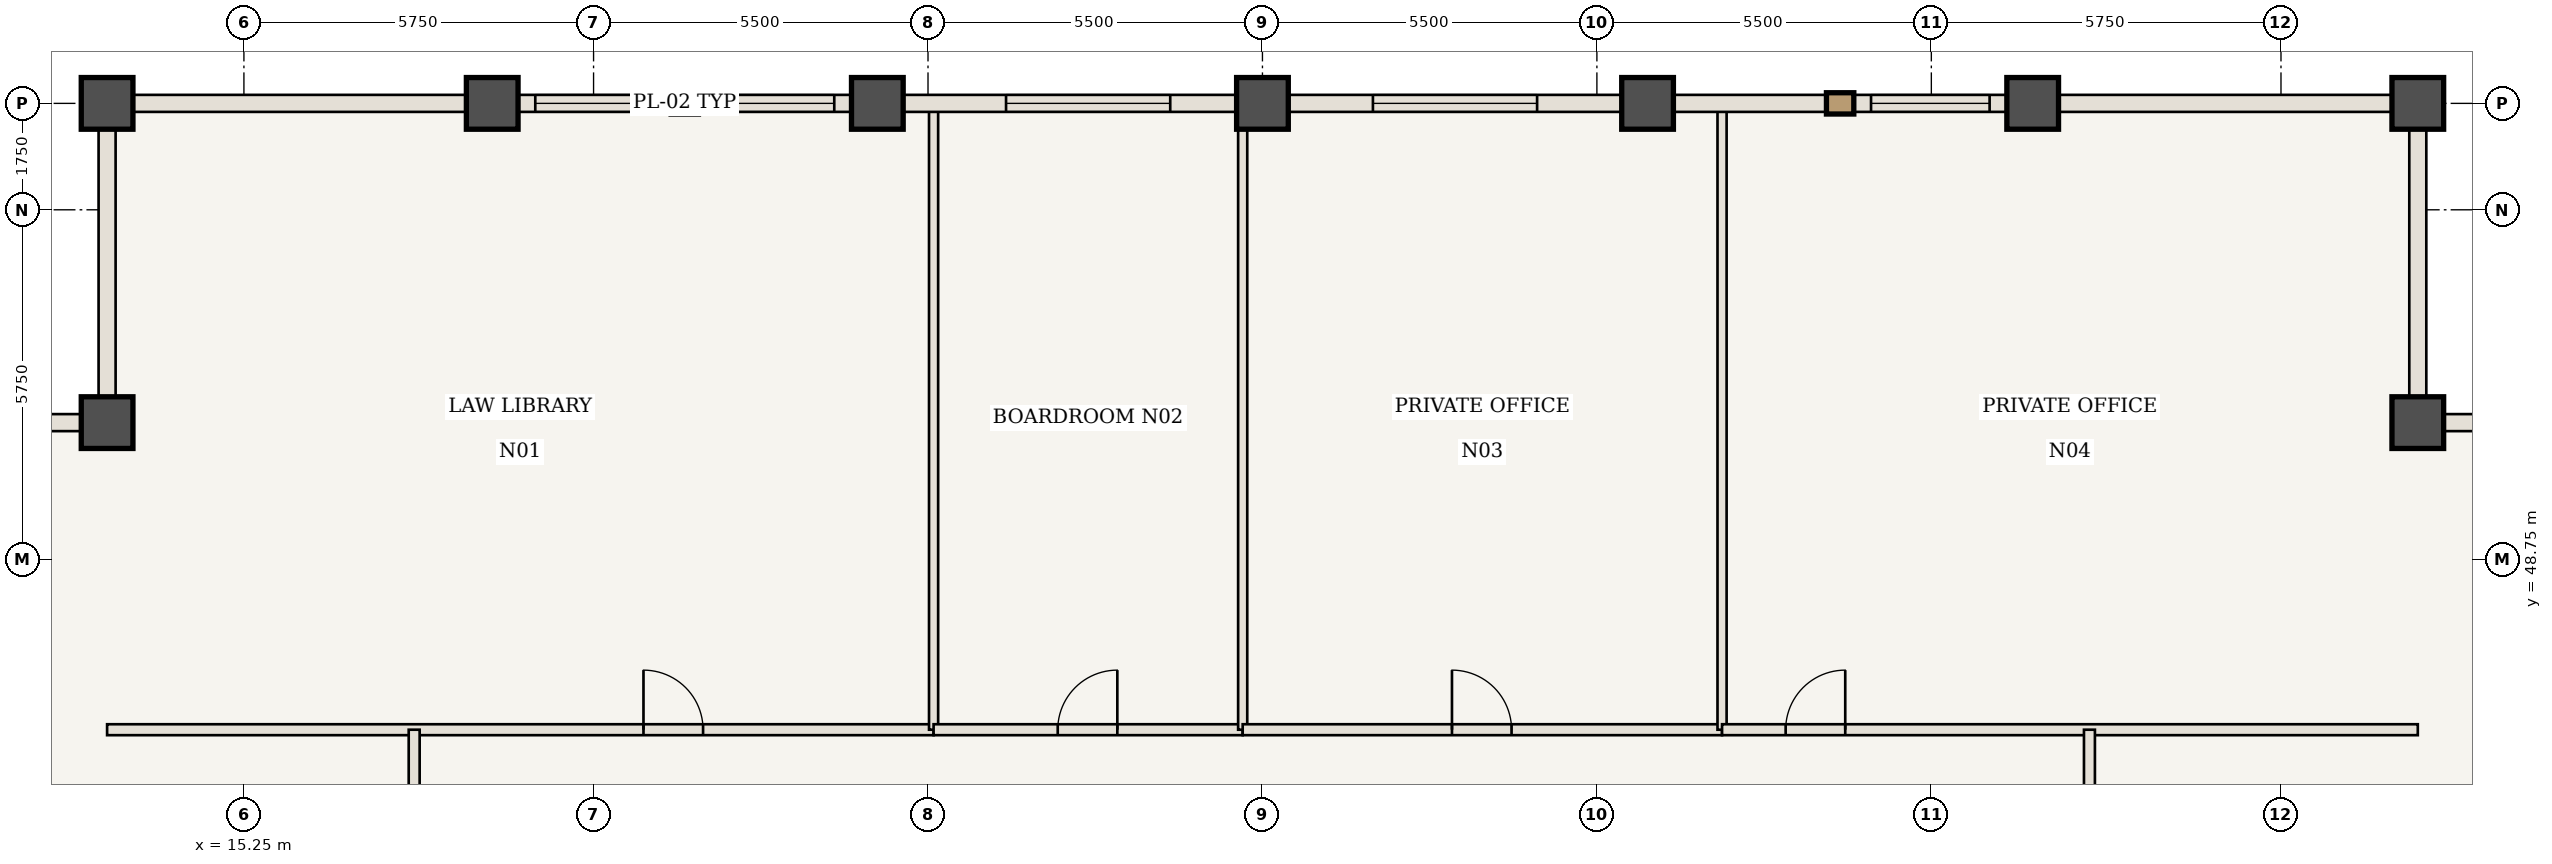
"""IFC4 building model, lengths in metres.
Left out: names, types, materials, properties, quantities, classifications, styles, units other than length and angle.
Written with IfcOpenShell. Run it as: python <this file> out.ifc"""

import sys

from ifc_helpers import new_model, si_unit, direction, frame, frame_2d, origin, origin_2d, place, context, subcontext, project, spatial, rectangle, extrude, element, fill, save


model = new_model("IFC4")
c1 = context("Model", 3, precision=1e-05, world=origin(), true_north=direction((0.0, 1.0)))
c2 = subcontext(c1, "Body", "Model", "MODEL_VIEW")
j1 = project(units=[si_unit("LENGTHUNIT", "METRE"), si_unit("PLANEANGLEUNIT", "RADIAN")], contexts=[c1])
p1 = place(None, origin())
s1 = spatial("IfcSite", under=j1, at=p1, CompositionType="ELEMENT")
p2 = place(p1, origin())
s2 = spatial("IfcBuilding", under=s1, at=p2, CompositionType="ELEMENT")
p3 = place(p2, frame((0.0, 0.0, 206.15)))
s3 = spatial("IfcBuildingStorey", under=s2, at=p3, CompositionType="ELEMENT", Elevation=206.15)
for number, where, z_axis, x_axis in (
    (1, (51.0, 51.0, 0.0), (0.0, 0.0, 1.0), (1.0, 0.0, 0.0)),
    (2, (51.0, 56.25, 0.0), (0.0, 0.0, 1.0), (1.0, 0.0, 0.0)),
    (3, (13.0, 56.25, 0.0), (0.0, 0.0, 1.0), (1.0, 0.0, 0.0)),
    (4, (13.0, 51.0, 0.0), (0.0, 0.0, 1.0), (1.0, 0.0, 0.0)),
    (5, (19.333, 56.25, 0.0), (0.0, 0.0, 1.0), (1.0, 0.0, 0.0)),
    (6, (25.667, 56.25, 0.0), (0.0, 0.0, 1.0), (1.0, 0.0, 0.0)),
    (7, (32.0, 56.25, 0.0), (0.0, 0.0, 1.0), (1.0, 0.0, 0.0)),
    (8, (38.333, 56.25, 0.0), (0.0, 0.0, 1.0), (1.0, 0.0, 0.0)),
    (9, (44.667, 56.25, 0.0), (0.0, 0.0, 1.0), (1.0, 0.0, 0.0)),
):
    element("IfcColumn", number, at=place(p3, frame(where, z_axis=z_axis, x_axis=x_axis)), inside=s3, PredefinedType="COLUMN", context=c2, shape_type="SweptSolid", body=[
        extrude(rectangle(XDim=0.85, YDim=0.85, at=origin_2d()), origin(), (0.0, 0.0, 1.0), 3.85),
    ])
p4 = place(p3, frame((13.0, 45.95, 0.0), z_axis=(0.0, 0.0, 1.0), x_axis=(1.0, 0.0, 0.0)))
e10 = element("IfcWall", 10, at=p4, inside=s3, PredefinedType="STANDARD", context=c2, shape_type="SweptSolid", body=[
    extrude(rectangle(XDim=13.592, YDim=0.18, at=frame_2d((6.796, 0.0))), origin(), (0.0, 0.0, 1.0), 3.685),
])
p5 = place(p4, frame((8.821, 0.0, 0.0)))
e11 = element("IfcOpeningElement", 11, at=p5, cuts=e10, PredefinedType="OPENING", context=c2, shape_type="SweptSolid", body=[
    extrude(rectangle(XDim=0.98, YDim=2.2, at=frame_2d((0.49, 1.1))), frame((0.0, 0.1, 0.0), z_axis=(0.0, -1.0, 0.0), x_axis=(1.0, 0.0, 0.0)), (0.0, 0.0, 1.0), 0.2),
])
p6 = place(p3, frame((26.592, 45.95, 0.0), z_axis=(0.0, 0.0, 1.0), x_axis=(0.0, 1.0, 0.0)))
e12 = element("IfcWall", 12, at=p6, inside=s3, PredefinedType="STANDARD", context=c2, shape_type="SweptSolid", body=[
    extrude(rectangle(XDim=10.24, YDim=0.15, at=frame_2d((5.12, 0.0))), origin(), (0.0, 0.0, 1.0), 3.685),
])
p7 = place(p3, frame((26.592, 45.95, 0.0), z_axis=(0.0, 0.0, 1.0), x_axis=(1.0, 0.0, 0.0)))
e13 = element("IfcWall", 13, at=p7, inside=s3, PredefinedType="STANDARD", context=c2, shape_type="SweptSolid", body=[
    extrude(rectangle(XDim=5.083, YDim=0.18, at=frame_2d((2.542, 0.0))), origin(), (0.0, 0.0, 1.0), 3.685),
])
p8 = place(p7, frame((2.042, 0.0, 0.0)))
e14 = element("IfcOpeningElement", 14, at=p8, cuts=e13, PredefinedType="OPENING", context=c2, shape_type="SweptSolid", body=[
    extrude(rectangle(XDim=0.98, YDim=2.2, at=frame_2d((0.49, 1.1))), frame((0.0, 0.1, 0.0), z_axis=(0.0, -1.0, 0.0), x_axis=(1.0, 0.0, 0.0)), (0.0, 0.0, 1.0), 0.2),
])
p9 = place(p3, frame((31.675, 45.95, 0.0), z_axis=(0.0, 0.0, 1.0), x_axis=(0.0, 1.0, 0.0)))
e15 = element("IfcWall", 15, at=p9, inside=s3, PredefinedType="STANDARD", context=c2, shape_type="SweptSolid", body=[
    extrude(rectangle(XDim=10.24, YDim=0.15, at=frame_2d((5.12, 0.0))), origin(), (0.0, 0.0, 1.0), 3.685),
])
p10 = place(p3, frame((31.675, 45.95, 0.0), z_axis=(0.0, 0.0, 1.0), x_axis=(1.0, 0.0, 0.0)))
e16 = element("IfcWall", 16, at=p10, inside=s3, PredefinedType="STANDARD", context=c2, shape_type="SweptSolid", body=[
    extrude(rectangle(XDim=7.883, YDim=0.18, at=frame_2d((3.942, 0.0))), origin(), (0.0, 0.0, 1.0), 3.685),
])
p11 = place(p10, frame((3.442, 0.0, 0.0)))
e17 = element("IfcOpeningElement", 17, at=p11, cuts=e16, PredefinedType="OPENING", context=c2, shape_type="SweptSolid", body=[
    extrude(rectangle(XDim=0.98, YDim=2.2, at=frame_2d((0.49, 1.1))), frame((0.0, 0.1, 0.0), z_axis=(0.0, -1.0, 0.0), x_axis=(1.0, 0.0, 0.0)), (0.0, 0.0, 1.0), 0.2),
])
p12 = place(p3, frame((39.558, 45.95, 0.0), z_axis=(0.0, 0.0, 1.0), x_axis=(0.0, 1.0, 0.0)))
e18 = element("IfcWall", 18, at=p12, inside=s3, PredefinedType="STANDARD", context=c2, shape_type="SweptSolid", body=[
    extrude(rectangle(XDim=10.24, YDim=0.15, at=frame_2d((5.12, 0.0))), origin(), (0.0, 0.0, 1.0), 3.685),
])
p13 = place(p3, frame((39.558, 45.95, 0.0), z_axis=(0.0, 0.0, 1.0), x_axis=(1.0, 0.0, 0.0)))
e19 = element("IfcWall", 19, at=p13, inside=s3, PredefinedType="STANDARD", context=c2, shape_type="SweptSolid", body=[
    extrude(rectangle(XDim=11.442, YDim=0.18, at=frame_2d((5.721, 0.0))), origin(), (0.0, 0.0, 1.0), 3.685),
])
p14 = place(p13, frame((1.046, 0.0, 0.0)))
e20 = element("IfcOpeningElement", 20, at=p14, cuts=e19, PredefinedType="OPENING", context=c2, shape_type="SweptSolid", body=[
    extrude(rectangle(XDim=0.98, YDim=2.2, at=frame_2d((0.49, 1.1))), frame((0.0, 0.1, 0.0), z_axis=(0.0, -1.0, 0.0), x_axis=(1.0, 0.0, 0.0)), (0.0, 0.0, 1.0), 0.2),
])
p15 = place(p3, frame((18.05, 30.875, 0.0), z_axis=(0.0, 0.0, 1.0), x_axis=(0.0, 1.0, 0.0)))
e21 = element("IfcWall", 21, at=p15, inside=s3, PredefinedType="STANDARD", context=c2, shape_type="SweptSolid", body=[
    extrude(rectangle(XDim=15.075, YDim=0.18, at=frame_2d((7.538, 0.0))), origin(), (0.0, 0.0, 1.0), 3.685),
])
p16 = place(p15, frame((7.038, 0.0, 0.0)))
e22 = element("IfcOpeningElement", 22, at=p16, cuts=e21, PredefinedType="OPENING", context=c2, shape_type="SweptSolid", body=[
    extrude(rectangle(XDim=0.98, YDim=2.2, at=frame_2d((0.49, 1.1))), frame((0.0, 0.1, 0.0), z_axis=(0.0, -1.0, 0.0), x_axis=(1.0, 0.0, 0.0)), (0.0, 0.0, 1.0), 0.2),
])
p17 = place(p3, frame((45.6, 30.75, 0.0), z_axis=(0.0, 0.0, 1.0), x_axis=(0.0, 1.0, 0.0)))
e23 = element("IfcWall", 23, at=p17, inside=s3, PredefinedType="STANDARD", context=c2, shape_type="SweptSolid", body=[
    extrude(rectangle(XDim=15.2, YDim=0.18, at=frame_2d((7.6, 0.0))), origin(), (0.0, 0.0, 1.0), 3.685),
])
p18 = place(p17, frame((7.1, 0.0, 0.0)))
e24 = element("IfcOpeningElement", 24, at=p18, cuts=e23, PredefinedType="OPENING", context=c2, shape_type="SweptSolid", body=[
    extrude(rectangle(XDim=0.98, YDim=2.2, at=frame_2d((0.49, 1.1))), frame((0.0, 0.1, 0.0), z_axis=(0.0, -1.0, 0.0), x_axis=(1.0, 0.0, 0.0)), (0.0, 0.0, 1.0), 0.2),
])
p19 = place(p3, frame((13.0, 56.25, 0.0), z_axis=(0.0, 0.0, 1.0), x_axis=(1.0, 0.0, 0.0)))
e25 = element("IfcWall", 25, at=p19, inside=s3, PredefinedType="USERDEFINED", context=c2, shape_type="SweptSolid", body=[
    extrude(rectangle(XDim=6.333, YDim=0.28, at=frame_2d((3.167, 0.0))), origin(), (0.0, 0.0, 1.0), 2.985),
])
p20 = place(p3, frame((19.333, 56.25, 0.0), z_axis=(0.0, 0.0, 1.0), x_axis=(1.0, 0.0, 0.0)))
e26 = element("IfcWall", 26, at=p20, inside=s3, PredefinedType="USERDEFINED", context=c2, shape_type="SweptSolid", body=[
    extrude(rectangle(XDim=6.333, YDim=0.28, at=frame_2d((3.167, 0.0))), origin(), (0.0, 0.0, 1.0), 2.985),
])
p21 = place(p20, frame((0.708, 0.0, 0.85)))
e27 = element("IfcOpeningElement", 27, at=p21, cuts=e26, PredefinedType="OPENING", context=c2, shape_type="SweptSolid", body=[
    extrude(rectangle(XDim=1.95, YDim=1.935, at=frame_2d((0.975, 0.968))), frame((0.0, 0.15, 0.0), z_axis=(0.0, -1.0, 0.0), x_axis=(1.0, 0.0, 0.0)), (0.0, 0.0, 1.0), 0.3),
])
p22 = place(p20, frame((3.675, 0.0, 0.85)))
e28 = element("IfcOpeningElement", 28, at=p22, cuts=e26, PredefinedType="OPENING", context=c2, shape_type="SweptSolid", body=[
    extrude(rectangle(XDim=1.95, YDim=1.935, at=frame_2d((0.975, 0.968))), frame((0.0, 0.15, 0.0), z_axis=(0.0, -1.0, 0.0), x_axis=(1.0, 0.0, 0.0)), (0.0, 0.0, 1.0), 0.3),
])
p23 = place(p3, frame((25.667, 56.25, 0.0), z_axis=(0.0, 0.0, 1.0), x_axis=(1.0, 0.0, 0.0)))
e29 = element("IfcWall", 29, at=p23, inside=s3, PredefinedType="USERDEFINED", context=c2, shape_type="SweptSolid", body=[
    extrude(rectangle(XDim=6.333, YDim=0.28, at=frame_2d((3.167, 0.0))), origin(), (0.0, 0.0, 1.0), 2.985),
])
p24 = place(p23, frame((2.117, 0.0, 0.85)))
e30 = element("IfcOpeningElement", 30, at=p24, cuts=e29, PredefinedType="OPENING", context=c2, shape_type="SweptSolid", body=[
    extrude(rectangle(XDim=2.7, YDim=1.935, at=frame_2d((1.35, 0.968))), frame((0.0, 0.15, 0.0), z_axis=(0.0, -1.0, 0.0), x_axis=(1.0, 0.0, 0.0)), (0.0, 0.0, 1.0), 0.3),
])
p25 = place(p3, frame((32.0, 56.25, 0.0), z_axis=(0.0, 0.0, 1.0), x_axis=(1.0, 0.0, 0.0)))
e31 = element("IfcWall", 31, at=p25, inside=s3, PredefinedType="USERDEFINED", context=c2, shape_type="SweptSolid", body=[
    extrude(rectangle(XDim=6.333, YDim=0.28, at=frame_2d((3.167, 0.0))), origin(), (0.0, 0.0, 1.0), 2.985),
])
p26 = place(p25, frame((1.817, 0.0, 0.85)))
e32 = element("IfcOpeningElement", 32, at=p26, cuts=e31, PredefinedType="OPENING", context=c2, shape_type="SweptSolid", body=[
    extrude(rectangle(XDim=2.7, YDim=1.935, at=frame_2d((1.35, 0.968))), frame((0.0, 0.15, 0.0), z_axis=(0.0, -1.0, 0.0), x_axis=(1.0, 0.0, 0.0)), (0.0, 0.0, 1.0), 0.3),
])
p27 = place(p3, frame((38.333, 56.25, 0.0), z_axis=(0.0, 0.0, 1.0), x_axis=(1.0, 0.0, 0.0)))
e33 = element("IfcWall", 33, at=p27, inside=s3, PredefinedType="USERDEFINED", context=c2, shape_type="SweptSolid", body=[
    extrude(rectangle(XDim=6.333, YDim=0.28, at=frame_2d((3.167, 0.0))), origin(), (0.0, 0.0, 1.0), 2.985),
])
p28 = place(p27, frame((3.675, 0.0, 0.85)))
e34 = element("IfcOpeningElement", 34, at=p28, cuts=e33, PredefinedType="OPENING", context=c2, shape_type="SweptSolid", body=[
    extrude(rectangle(XDim=1.95, YDim=1.935, at=frame_2d((0.975, 0.968))), frame((0.0, 0.15, 0.0), z_axis=(0.0, -1.0, 0.0), x_axis=(1.0, 0.0, 0.0)), (0.0, 0.0, 1.0), 0.3),
])
p29 = place(p3, frame((44.667, 56.25, 0.0), z_axis=(0.0, 0.0, 1.0), x_axis=(1.0, 0.0, 0.0)))
e35 = element("IfcWall", 35, at=p29, inside=s3, PredefinedType="USERDEFINED", context=c2, shape_type="SweptSolid", body=[
    extrude(rectangle(XDim=6.333, YDim=0.28, at=frame_2d((3.167, 0.0))), origin(), (0.0, 0.0, 1.0), 2.985),
])
for number, where, z_axis, x_axis in (
    (36, (51.0, 51.0, 0.0), (0.0, 0.0, 1.0), (1.0, 0.0, 0.0)),
    (37, (51.0, 56.25, 0.0), (0.0, 0.0, 1.0), (0.0, -1.0, 0.0)),
    (38, (13.0, 51.0, 0.0), (0.0, 0.0, 1.0), (0.0, 1.0, 0.0)),
    (39, (7.75, 51.0, 0.0), (0.0, 0.0, 1.0), (1.0, 0.0, 0.0)),
):
    element("IfcWall", number, at=place(p3, frame(where, z_axis=z_axis, x_axis=x_axis)), inside=s3, PredefinedType="USERDEFINED", context=c2, shape_type="SweptSolid", body=[
        extrude(rectangle(XDim=5.25, YDim=0.28, at=frame_2d((2.625, 0.0))), origin(), (0.0, 0.0, 1.0), 2.985),
    ])
p30 = place(p5, origin())
e40 = element("IfcDoor", 40, at=p30, inside=s3, OperationType="SINGLE_SWING_LEFT", PredefinedType="DOOR", context=c2, shape_type="SweptSolid", body=[
    extrude(rectangle(XDim=0.98, YDim=2.2, at=frame_2d((0.49, 1.1))), frame((0.0, 0.025, 0.0), z_axis=(0.0, -1.0, 0.0), x_axis=(1.0, 0.0, 0.0)), (0.0, 0.0, 1.0), 0.05),
])
fill(e11, e40)
p31 = place(p8, origin())
e41 = element("IfcDoor", 41, at=p31, inside=s3, OperationType="SINGLE_SWING_RIGHT", PredefinedType="DOOR", context=c2, shape_type="SweptSolid", body=[
    extrude(rectangle(XDim=0.98, YDim=2.2, at=frame_2d((0.49, 1.1))), frame((0.0, 0.025, 0.0), z_axis=(0.0, -1.0, 0.0), x_axis=(1.0, 0.0, 0.0)), (0.0, 0.0, 1.0), 0.05),
])
fill(e14, e41)
p32 = place(p11, origin())
e42 = element("IfcDoor", 42, at=p32, inside=s3, OperationType="SINGLE_SWING_LEFT", PredefinedType="DOOR", context=c2, shape_type="SweptSolid", body=[
    extrude(rectangle(XDim=0.98, YDim=2.2, at=frame_2d((0.49, 1.1))), frame((0.0, 0.025, 0.0), z_axis=(0.0, -1.0, 0.0), x_axis=(1.0, 0.0, 0.0)), (0.0, 0.0, 1.0), 0.05),
])
fill(e17, e42)
p33 = place(p14, origin())
e43 = element("IfcDoor", 43, at=p33, inside=s3, OperationType="SINGLE_SWING_RIGHT", PredefinedType="DOOR", context=c2, shape_type="SweptSolid", body=[
    extrude(rectangle(XDim=0.98, YDim=2.2, at=frame_2d((0.49, 1.1))), frame((0.0, 0.025, 0.0), z_axis=(0.0, -1.0, 0.0), x_axis=(1.0, 0.0, 0.0)), (0.0, 0.0, 1.0), 0.05),
])
fill(e20, e43)
p34 = place(p21, origin())
e44 = element("IfcWindow", 44, at=p34, inside=s3, PartitioningType="SINGLE_PANEL", PredefinedType="WINDOW", context=c2, shape_type="SweptSolid", body=[
    extrude(rectangle(XDim=1.95, YDim=1.935, at=frame_2d((0.975, 0.968))), frame((0.0, 0.03, 0.0), z_axis=(0.0, -1.0, 0.0), x_axis=(1.0, 0.0, 0.0)), (0.0, 0.0, 1.0), 0.06),
])
fill(e27, e44)
p35 = place(p22, origin())
e45 = element("IfcWindow", 45, at=p35, inside=s3, PartitioningType="SINGLE_PANEL", PredefinedType="WINDOW", context=c2, shape_type="SweptSolid", body=[
    extrude(rectangle(XDim=1.95, YDim=1.935, at=frame_2d((0.975, 0.968))), frame((0.0, 0.03, 0.0), z_axis=(0.0, -1.0, 0.0), x_axis=(1.0, 0.0, 0.0)), (0.0, 0.0, 1.0), 0.06),
])
fill(e28, e45)
p36 = place(p24, origin())
e46 = element("IfcWindow", 46, at=p36, inside=s3, PartitioningType="SINGLE_PANEL", PredefinedType="WINDOW", context=c2, shape_type="SweptSolid", body=[
    extrude(rectangle(XDim=2.7, YDim=1.935, at=frame_2d((1.35, 0.968))), frame((0.0, 0.03, 0.0), z_axis=(0.0, -1.0, 0.0), x_axis=(1.0, 0.0, 0.0)), (0.0, 0.0, 1.0), 0.06),
])
fill(e30, e46)
p37 = place(p26, origin())
e47 = element("IfcWindow", 47, at=p37, inside=s3, PartitioningType="SINGLE_PANEL", PredefinedType="WINDOW", context=c2, shape_type="SweptSolid", body=[
    extrude(rectangle(XDim=2.7, YDim=1.935, at=frame_2d((1.35, 0.968))), frame((0.0, 0.03, 0.0), z_axis=(0.0, -1.0, 0.0), x_axis=(1.0, 0.0, 0.0)), (0.0, 0.0, 1.0), 0.06),
])
fill(e32, e47)
p38 = place(p28, origin())
e48 = element("IfcWindow", 48, at=p38, inside=s3, PartitioningType="SINGLE_PANEL", PredefinedType="WINDOW", context=c2, shape_type="SweptSolid", body=[
    extrude(rectangle(XDim=1.95, YDim=1.935, at=frame_2d((0.975, 0.968))), frame((0.0, 0.03, 0.0), z_axis=(0.0, -1.0, 0.0), x_axis=(1.0, 0.0, 0.0)), (0.0, 0.0, 1.0), 0.06),
])
fill(e34, e48)
save(model, sys.argv[1])
